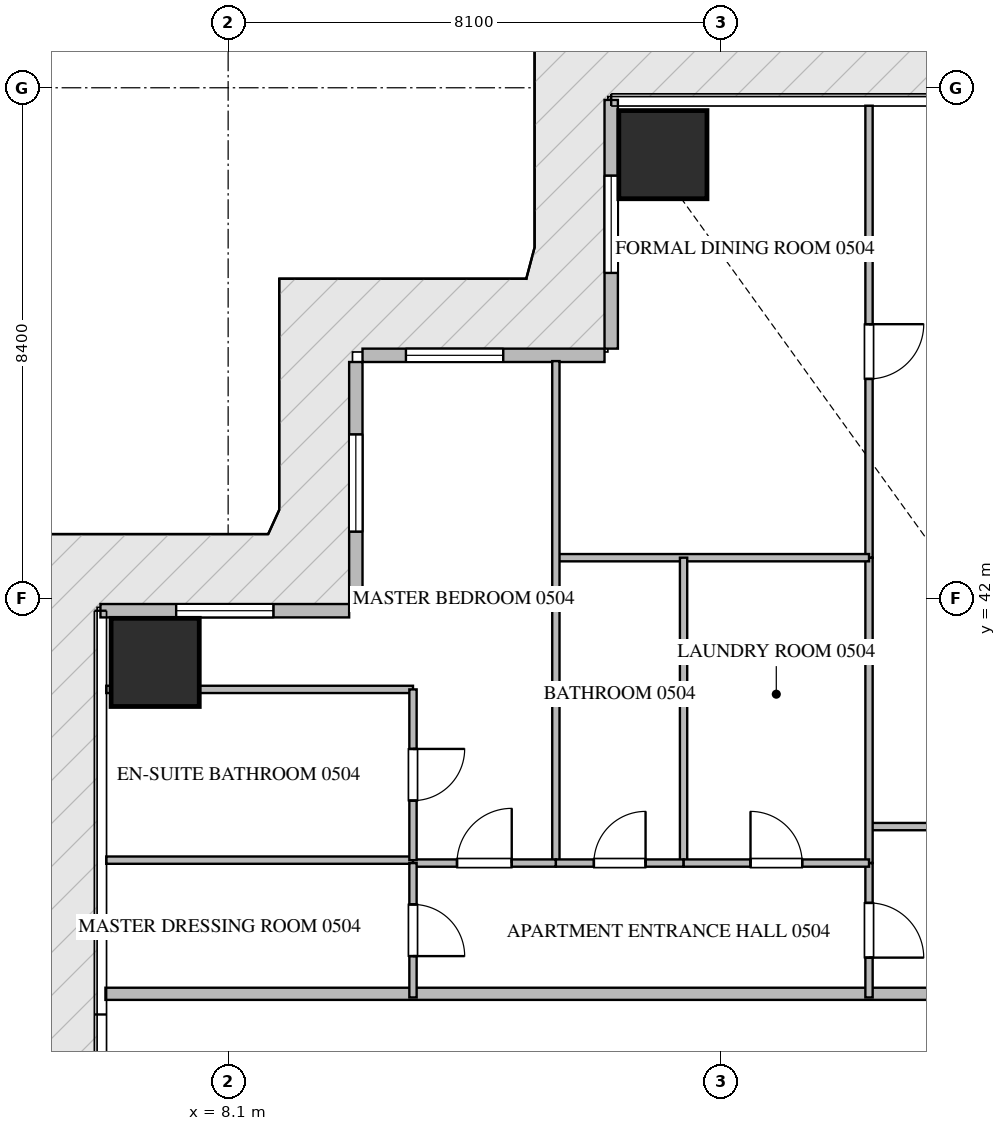
"""IFC4 building model, lengths in metres.
Left out: names, types, materials, properties, quantities, classifications, styles, units other than length and angle.
Written with IfcOpenShell. Run it as: python <this file> out.ifc"""

import sys

from ifc_helpers import new_model, si_unit, direction, frame, frame_2d, origin, origin_2d, place, context, subcontext, project, spatial, rectangle, extrude, source, transform, mapped, element, fill, save


model = new_model("IFC4")
c1 = context("Model", 3, precision=1e-05, world=origin(), true_north=direction((0.0, 1.0)))
c2 = subcontext(c1, "Body", "Model", "MODEL_VIEW")
j1 = project(units=[si_unit("LENGTHUNIT", "METRE"), si_unit("PLANEANGLEUNIT", "RADIAN")], contexts=[c1])
p1 = place(None, origin())
s1 = spatial("IfcSite", under=j1, at=p1, CompositionType="ELEMENT")
p2 = place(p1, origin())
s2 = spatial("IfcBuilding", under=s1, at=p2, CompositionType="ELEMENT")
p3 = place(p2, frame((0.0, 0.0, 26.7)))
s3 = spatial("IfcBuildingStorey", under=s2, at=p3, CompositionType="ELEMENT", Elevation=26.7)
m1 = source(origin(), c2, "Body", "SweptSolid", [
    extrude(rectangle(XDim=1.45, YDim=1.45, at=origin_2d()), origin(), (0.0, 0.0, 1.0), 3.93),
])
for number, where, z_axis, x_axis in (
    (1, (15.25, 49.3, -0.44), (0.0, 0.0, 1.0), (1.0, 0.0, 0.0)),
    (2, (6.9, 40.95, -0.44), (0.0, 0.0, 1.0), (1.0, 0.0, 0.0)),
):
    element("IfcColumn", number, at=place(p3, frame(where, z_axis=z_axis, x_axis=x_axis)), inside=s3, PredefinedType="COLUMN", context=c2, shape_type="MappedRepresentation", body=[
        mapped(m1, transform((0.0, 0.0, 0.0), scale=1.0)),
    ])
p4 = place(p3, frame((14.4, 50.2, 0.0), z_axis=(0.0, 0.0, 1.0), x_axis=(0.0, -1.0, 0.0)))
e3 = element("IfcWall", 3, at=p4, inside=s3, PredefinedType="ELEMENTEDWALL", context=c2, shape_type="SweptSolid", body=[
    extrude(rectangle(XDim=4.09, YDim=0.22, at=frame_2d((2.045, 0.0))), origin(), (0.0, 0.0, 1.0), 3.475),
])
p5 = place(p4, frame((1.245, 0.0, 0.65)))
e4 = element("IfcOpeningElement", 4, at=p5, cuts=e3, PredefinedType="OPENING", context=c2, shape_type="SweptSolid", body=[
    extrude(rectangle(XDim=1.6, YDim=2.1, at=frame_2d((0.8, 1.05))), frame((0.0, 0.12, 0.0), z_axis=(0.0, -1.0, 0.0), x_axis=(1.0, 0.0, 0.0)), (0.0, 0.0, 1.0), 0.24),
])
p6 = place(p3, frame((14.29, 46.0, 0.0), z_axis=(0.0, 0.0, 1.0), x_axis=(-1.0, 0.0, 0.0)))
e5 = element("IfcWall", 5, at=p6, inside=s3, PredefinedType="ELEMENTEDWALL", context=c2, shape_type="SweptSolid", body=[
    extrude(rectangle(XDim=3.98, YDim=0.22, at=frame_2d((1.99, 0.0))), origin(), (0.0, 0.0, 1.0), 3.475),
])
p7 = place(p6, frame((1.666, 0.0, 0.65)))
e6 = element("IfcOpeningElement", 6, at=p7, cuts=e5, PredefinedType="OPENING", context=c2, shape_type="SweptSolid", body=[
    extrude(rectangle(XDim=1.6, YDim=2.1, at=frame_2d((0.8, 1.05))), frame((0.0, 0.12, 0.0), z_axis=(0.0, -1.0, 0.0), x_axis=(1.0, 0.0, 0.0)), (0.0, 0.0, 1.0), 0.24),
])
p8 = place(p3, frame((10.2, 45.89, 0.0), z_axis=(0.0, 0.0, 1.0), x_axis=(0.0, -1.0, 0.0)))
e7 = element("IfcWall", 7, at=p8, inside=s3, PredefinedType="ELEMENTEDWALL", context=c2, shape_type="SweptSolid", body=[
    extrude(rectangle(XDim=3.98, YDim=0.22, at=frame_2d((1.99, 0.0))), origin(), (0.0, 0.0, 1.0), 3.475),
])
p9 = place(p8, frame((1.19, 0.0, 0.65)))
e8 = element("IfcOpeningElement", 8, at=p9, cuts=e7, PredefinedType="OPENING", context=c2, shape_type="SweptSolid", body=[
    extrude(rectangle(XDim=1.6, YDim=2.1, at=frame_2d((0.8, 1.05))), frame((0.0, 0.12, 0.0), z_axis=(0.0, -1.0, 0.0), x_axis=(1.0, 0.0, 0.0)), (0.0, 0.0, 1.0), 0.24),
])
p10 = place(p3, frame((10.09, 41.8, 0.0), z_axis=(0.0, 0.0, 1.0), x_axis=(-1.0, 0.0, 0.0)))
e9 = element("IfcWall", 9, at=p10, inside=s3, PredefinedType="ELEMENTEDWALL", context=c2, shape_type="SweptSolid", body=[
    extrude(rectangle(XDim=4.09, YDim=0.22, at=frame_2d((2.045, 0.0))), origin(), (0.0, 0.0, 1.0), 3.475),
])
p11 = place(p10, frame((1.245, 0.0, 0.65)))
e10 = element("IfcOpeningElement", 10, at=p11, cuts=e9, PredefinedType="OPENING", context=c2, shape_type="SweptSolid", body=[
    extrude(rectangle(XDim=1.6, YDim=2.1, at=frame_2d((0.8, 1.05))), frame((0.0, 0.12, 0.0), z_axis=(0.0, -1.0, 0.0), x_axis=(1.0, 0.0, 0.0)), (0.0, 0.0, 1.0), 0.24),
])
p12 = place(p3, frame((6.082, 35.5, 0.0), z_axis=(0.0, 0.0, 1.0), x_axis=(1.0, 0.0, 0.0)))
e11 = element("IfcWall", 11, at=p12, inside=s3, PredefinedType="PARTITIONING", context=c2, shape_type="SweptSolid", body=[
    extrude(rectangle(XDim=15.318, YDim=0.2, at=frame_2d((7.659, 0.0))), origin(), (0.0, 0.0, 1.0), 3.49),
])
p13 = place(p3, frame((18.64, 38.25, 0.0), z_axis=(0.0, 0.0, 1.0), x_axis=(1.0, 0.0, 0.0)))
e12 = element("IfcWall", 12, at=p13, inside=s3, PredefinedType="PARTITIONING", context=c2, shape_type="SweptSolid", body=[
    extrude(rectangle(XDim=2.85, YDim=0.12, at=frame_2d((1.425, 0.0))), origin(), (0.0, 0.0, 1.0), 3.49),
])
p14 = place(p13, frame((1.0, 0.0, 0.0)))
e13 = element("IfcOpeningElement", 13, at=p14, cuts=e12, PredefinedType="OPENING", context=c2, shape_type="SweptSolid", body=[
    extrude(rectangle(XDim=0.85, YDim=2.1, at=frame_2d((0.425, 1.05))), frame((0.0, 0.07, 0.0), z_axis=(0.0, -1.0, 0.0), x_axis=(1.0, 0.0, 0.0)), (0.0, 0.0, 1.0), 0.14),
])
p15 = place(p3, frame((18.64, 37.65, 0.0), z_axis=(0.0, 0.0, 1.0), x_axis=(0.0, -1.0, 0.0)))
e14 = element("IfcWall", 14, at=p15, inside=s3, PredefinedType="PARTITIONING", context=c2, shape_type="SweptSolid", body=[
    extrude(rectangle(XDim=2.21, YDim=0.12, at=frame_2d((1.105, 0.0))), origin(), (0.0, 0.0, 1.0), 3.49),
])
p16 = place(p15, frame((0.655, 0.0, 0.0)))
e15 = element("IfcOpeningElement", 15, at=p16, cuts=e14, PredefinedType="OPENING", context=c2, shape_type="SweptSolid", body=[
    extrude(rectangle(XDim=0.9, YDim=2.1, at=frame_2d((0.45, 1.05))), frame((0.0, 0.07, 0.0), z_axis=(0.0, -1.0, 0.0), x_axis=(1.0, 0.0, 0.0)), (0.0, 0.0, 1.0), 0.14),
])
p17 = place(p3, frame((18.64, 50.105, 0.0), z_axis=(0.0, 0.0, 1.0), x_axis=(0.0, -1.0, 0.0)))
e16 = element("IfcWall", 16, at=p17, inside=s3, PredefinedType="PARTITIONING", context=c2, shape_type="SweptSolid", body=[
    extrude(rectangle(XDim=7.433, YDim=0.12, at=frame_2d((3.716, 0.0))), origin(), (0.0, 0.0, 1.0), 3.49),
])
p18 = place(p17, frame((3.593, 0.0, 0.0)))
e17 = element("IfcOpeningElement", 17, at=p18, cuts=e16, PredefinedType="OPENING", context=c2, shape_type="SweptSolid", body=[
    extrude(rectangle(XDim=0.9, YDim=2.1, at=frame_2d((0.45, 1.05))), frame((0.0, 0.07, 0.0), z_axis=(0.0, -1.0, 0.0), x_axis=(1.0, 0.0, 0.0)), (0.0, 0.0, 1.0), 0.14),
])
p19 = place(p3, frame((18.64, 42.67, 0.0), z_axis=(0.0, 0.0, 1.0), x_axis=(0.0, -1.0, 0.0)))
e18 = element("IfcWall", 18, at=p19, inside=s3, PredefinedType="PARTITIONING", context=c2, shape_type="SweptSolid", body=[
    extrude(rectangle(XDim=5.018, YDim=0.12, at=frame_2d((2.509, 0.0))), origin(), (0.0, 0.0, 1.0), 3.49),
])
p20 = place(p3, frame((13.49, 42.672, 0.0), z_axis=(0.0, 0.0, 1.0), x_axis=(1.0, 0.0, 0.0)))
e19 = element("IfcWall", 19, at=p20, inside=s3, PredefinedType="PARTITIONING", context=c2, shape_type="SweptSolid", body=[
    extrude(rectangle(XDim=5.15, YDim=0.12, at=frame_2d((2.575, 0.0))), origin(), (0.0, 0.0, 1.0), 3.49),
])
p21 = place(p3, frame((13.49, 45.905, 0.0), z_axis=(0.0, 0.0, 1.0), x_axis=(0.0, -1.0, 0.0)))
e20 = element("IfcWall", 20, at=p21, inside=s3, PredefinedType="PARTITIONING", context=c2, shape_type="SweptSolid", body=[
    extrude(rectangle(XDim=8.255, YDim=0.12, at=frame_2d((4.127, 0.0))), origin(), (0.0, 0.0, 1.0), 3.49),
])
p22 = place(p3, frame((15.59, 42.672, 0.0), z_axis=(0.0, 0.0, 1.0), x_axis=(0.0, -1.0, 0.0)))
e21 = element("IfcWall", 21, at=p22, inside=s3, PredefinedType="PARTITIONING", context=c2, shape_type="SweptSolid", body=[
    extrude(rectangle(XDim=5.022, YDim=0.12, at=frame_2d((2.511, 0.0))), origin(), (0.0, 0.0, 1.0), 3.49),
])
p23 = place(p3, frame((13.49, 37.65, 0.0), z_axis=(0.0, 0.0, 1.0), x_axis=(1.0, 0.0, 0.0)))
e22 = element("IfcWall", 22, at=p23, inside=s3, PredefinedType="PARTITIONING", context=c2, shape_type="SweptSolid", body=[
    extrude(rectangle(XDim=2.1, YDim=0.12, at=frame_2d((1.05, 0.0))), origin(), (0.0, 0.0, 1.0), 3.49),
])
p24 = place(p23, frame((0.625, 0.0, 0.0)))
e23 = element("IfcOpeningElement", 23, at=p24, cuts=e22, PredefinedType="OPENING", context=c2, shape_type="SweptSolid", body=[
    extrude(rectangle(XDim=0.85, YDim=2.1, at=frame_2d((0.425, 1.05))), frame((0.0, 0.07, 0.0), z_axis=(0.0, -1.0, 0.0), x_axis=(1.0, 0.0, 0.0)), (0.0, 0.0, 1.0), 0.14),
])
p25 = place(p3, frame((15.592, 37.65, 0.0), z_axis=(0.0, 0.0, 1.0), x_axis=(1.0, 0.0, 0.0)))
e24 = element("IfcWall", 24, at=p25, inside=s3, PredefinedType="PARTITIONING", context=c2, shape_type="SweptSolid", body=[
    extrude(rectangle(XDim=3.048, YDim=0.12, at=frame_2d((1.524, 0.0))), origin(), (0.0, 0.0, 1.0), 3.49),
])
p26 = place(p25, frame((1.099, 0.0, 0.0)))
e25 = element("IfcOpeningElement", 25, at=p26, cuts=e24, PredefinedType="OPENING", context=c2, shape_type="SweptSolid", body=[
    extrude(rectangle(XDim=0.85, YDim=2.1, at=frame_2d((0.425, 1.05))), frame((0.0, 0.07, 0.0), z_axis=(0.0, -1.0, 0.0), x_axis=(1.0, 0.0, 0.0)), (0.0, 0.0, 1.0), 0.14),
])
p27 = place(p3, frame((11.14, 37.65, 0.0), z_axis=(0.0, 0.0, 1.0), x_axis=(1.0, 0.0, 0.0)))
e26 = element("IfcWall", 26, at=p27, inside=s3, PredefinedType="PARTITIONING", context=c2, shape_type="SweptSolid", body=[
    extrude(rectangle(XDim=2.348, YDim=0.12, at=frame_2d((1.174, 0.0))), origin(), (0.0, 0.0, 1.0), 3.49),
])
p28 = place(p27, frame((0.724, 0.0, 0.0)))
e27 = element("IfcOpeningElement", 27, at=p28, cuts=e26, PredefinedType="OPENING", context=c2, shape_type="SweptSolid", body=[
    extrude(rectangle(XDim=0.9, YDim=2.1, at=frame_2d((0.45, 1.05))), frame((0.0, 0.07, 0.0), z_axis=(0.0, -1.0, 0.0), x_axis=(1.0, 0.0, 0.0)), (0.0, 0.0, 1.0), 0.14),
])
p29 = place(p3, frame((6.095, 40.506, 0.0), z_axis=(0.0, 0.0, 1.0), x_axis=(1.0, 0.0, 0.0)))
e28 = element("IfcWall", 28, at=p29, inside=s3, PredefinedType="PARTITIONING", context=c2, shape_type="SweptSolid", body=[
    extrude(rectangle(XDim=5.045, YDim=0.12, at=frame_2d((2.522, 0.0))), origin(), (0.0, 0.0, 1.0), 3.49),
])
p30 = place(p3, frame((6.095, 37.698, 0.0), z_axis=(0.0, 0.0, 1.0), x_axis=(1.0, 0.0, 0.0)))
e29 = element("IfcWall", 29, at=p30, inside=s3, PredefinedType="PARTITIONING", context=c2, shape_type="SweptSolid", body=[
    extrude(rectangle(XDim=5.043, YDim=0.12, at=frame_2d((2.521, 0.0))), origin(), (0.0, 0.0, 1.0), 3.49),
])
p31 = place(p3, frame((11.14, 40.506, 0.0), z_axis=(0.0, 0.0, 1.0), x_axis=(0.0, -1.0, 0.0)))
e30 = element("IfcWall", 30, at=p31, inside=s3, PredefinedType="PARTITIONING", context=c2, shape_type="SweptSolid", body=[
    extrude(rectangle(XDim=2.808, YDim=0.12, at=frame_2d((1.404, 0.0))), origin(), (0.0, 0.0, 1.0), 3.49),
])
p32 = place(p31, frame((0.979, 0.0, 0.0)))
e31 = element("IfcOpeningElement", 31, at=p32, cuts=e30, PredefinedType="OPENING", context=c2, shape_type="SweptSolid", body=[
    extrude(rectangle(XDim=0.85, YDim=2.1, at=frame_2d((0.425, 1.05))), frame((0.0, 0.07, 0.0), z_axis=(0.0, -1.0, 0.0), x_axis=(1.0, 0.0, 0.0)), (0.0, 0.0, 1.0), 0.14),
])
p33 = place(p3, frame((11.14, 37.65, 0.0), z_axis=(0.0, 0.0, 1.0), x_axis=(0.0, -1.0, 0.0)))
e32 = element("IfcWall", 32, at=p33, inside=s3, PredefinedType="PARTITIONING", context=c2, shape_type="SweptSolid", body=[
    extrude(rectangle(XDim=2.21, YDim=0.12, at=frame_2d((1.105, 0.0))), origin(), (0.0, 0.0, 1.0), 3.49),
])
p34 = place(p33, frame((0.68, 0.0, 0.0)))
e33 = element("IfcOpeningElement", 33, at=p34, cuts=e32, PredefinedType="OPENING", context=c2, shape_type="SweptSolid", body=[
    extrude(rectangle(XDim=0.85, YDim=2.1, at=frame_2d((0.425, 1.05))), frame((0.0, 0.07, 0.0), z_axis=(0.0, -1.0, 0.0), x_axis=(1.0, 0.0, 0.0)), (0.0, 0.0, 1.0), 0.14),
])
m2 = source(origin(), c2, "Body", "SweptSolid", [
    extrude(rectangle(XDim=1.6, YDim=2.1, at=frame_2d((0.8, 1.05))), frame((0.0, 0.03, 0.0), z_axis=(0.0, -1.0, 0.0), x_axis=(1.0, 0.0, 0.0)), (0.0, 0.0, 1.0), 0.06),
])
p35 = place(p5, origin())
e34 = element("IfcWindow", 34, at=p35, inside=s3, PartitioningType="SINGLE_PANEL", PredefinedType="WINDOW", context=c2, shape_type="MappedRepresentation", body=[
    mapped(m2, transform((0.0, 0.0, 0.0), scale=1.0)),
])
fill(e4, e34)
p36 = place(p7, origin())
e35 = element("IfcWindow", 35, at=p36, inside=s3, PartitioningType="SINGLE_PANEL", PredefinedType="WINDOW", context=c2, shape_type="MappedRepresentation", body=[
    mapped(m2, transform((0.0, 0.0, 0.0), scale=1.0)),
])
fill(e6, e35)
p37 = place(p9, origin())
e36 = element("IfcWindow", 36, at=p37, inside=s3, PartitioningType="SINGLE_PANEL", PredefinedType="WINDOW", context=c2, shape_type="MappedRepresentation", body=[
    mapped(m2, transform((0.0, 0.0, 0.0), scale=1.0)),
])
fill(e8, e36)
p38 = place(p11, origin())
e37 = element("IfcWindow", 37, at=p38, inside=s3, PartitioningType="SINGLE_PANEL", PredefinedType="WINDOW", context=c2, shape_type="MappedRepresentation", body=[
    mapped(m2, transform((0.0, 0.0, 0.0), scale=1.0)),
])
fill(e10, e37)
m3 = source(origin(), c2, "Body", "SweptSolid", [
    extrude(rectangle(XDim=0.9, YDim=2.1, at=frame_2d((0.45, 1.05))), frame((0.0, 0.025, 0.0), z_axis=(0.0, -1.0, 0.0), x_axis=(1.0, 0.0, 0.0)), (0.0, 0.0, 1.0), 0.05),
])
p39 = place(p16, origin())
e38 = element("IfcDoor", 38, at=p39, inside=s3, OperationType="SINGLE_SWING_RIGHT", PredefinedType="DOOR", context=c2, shape_type="MappedRepresentation", body=[
    mapped(m3, transform((0.0, 0.0, 0.0), scale=1.0)),
])
fill(e15, e38)
p40 = place(p18, origin())
e39 = element("IfcDoor", 39, at=p40, inside=s3, OperationType="SINGLE_SWING_LEFT", PredefinedType="DOOR", context=c2, shape_type="MappedRepresentation", body=[
    mapped(m3, transform((0.0, 0.0, 0.0), scale=1.0)),
])
fill(e17, e39)
m4 = source(origin(), c2, "Body", "SweptSolid", [
    extrude(rectangle(XDim=0.85, YDim=2.1, at=frame_2d((0.425, 1.05))), frame((0.0, 0.025, 0.0), z_axis=(0.0, -1.0, 0.0), x_axis=(1.0, 0.0, 0.0)), (0.0, 0.0, 1.0), 0.05),
])
p41 = place(p24, origin())
e40 = element("IfcDoor", 40, at=p41, inside=s3, OperationType="SINGLE_SWING_RIGHT", PredefinedType="DOOR", context=c2, shape_type="MappedRepresentation", body=[
    mapped(m4, transform((0.0, 0.0, 0.0), scale=1.0)),
])
fill(e23, e40)
p42 = place(p26, origin())
e41 = element("IfcDoor", 41, at=p42, inside=s3, OperationType="SINGLE_SWING_LEFT", PredefinedType="DOOR", context=c2, shape_type="MappedRepresentation", body=[
    mapped(m4, transform((0.0, 0.0, 0.0), scale=1.0)),
])
fill(e25, e41)
p43 = place(p28, origin())
e42 = element("IfcDoor", 42, at=p43, inside=s3, OperationType="SINGLE_SWING_RIGHT", PredefinedType="DOOR", context=c2, shape_type="MappedRepresentation", body=[
    mapped(m3, transform((0.0, 0.0, 0.0), scale=1.0)),
])
fill(e27, e42)
p44 = place(p32, origin())
e43 = element("IfcDoor", 43, at=p44, inside=s3, OperationType="SINGLE_SWING_LEFT", PredefinedType="DOOR", context=c2, shape_type="MappedRepresentation", body=[
    mapped(m4, transform((0.0, 0.0, 0.0), scale=1.0)),
])
fill(e31, e43)
p45 = place(p34, origin())
e44 = element("IfcDoor", 44, at=p45, inside=s3, OperationType="SINGLE_SWING_RIGHT", PredefinedType="DOOR", context=c2, shape_type="MappedRepresentation", body=[
    mapped(m4, transform((0.0, 0.0, 0.0), scale=1.0)),
])
fill(e33, e44)
save(model, sys.argv[1])
